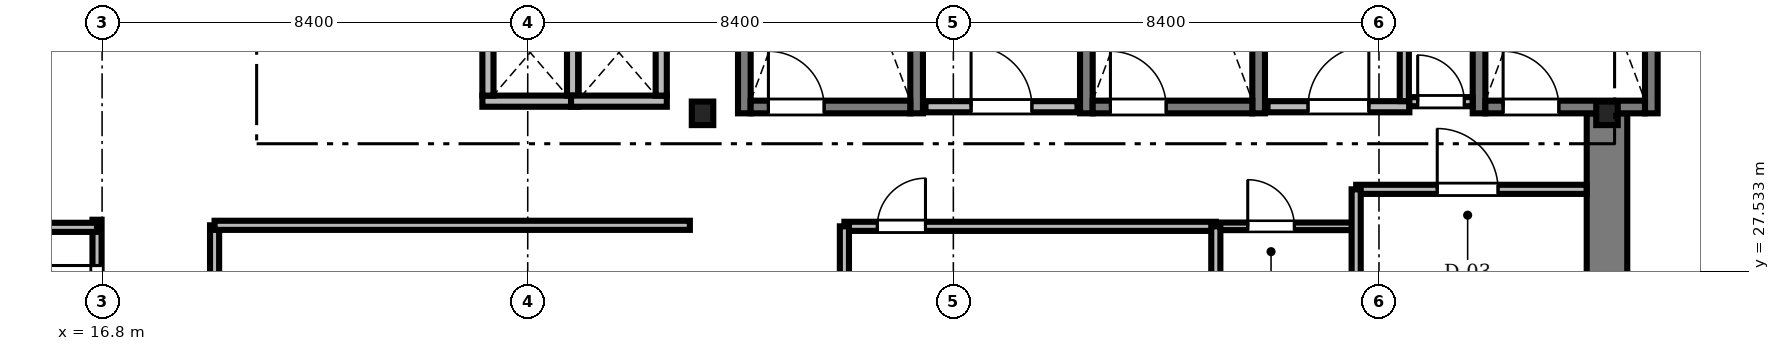
"""IFC4 building model, lengths in metres.
Left out: names, types, materials, properties, quantities, classifications, styles, units other than length and angle.
Written with IfcOpenShell. Run it as: python <this file> out.ifc"""

import sys

from ifc_helpers import new_model, si_unit, direction, frame, frame_2d, origin, origin_2d, place, context, subcontext, project, spatial, rectangle, i_section, extrude, source, transform, mapped, element, fill, save


model = new_model("IFC4")
c1 = context("Model", 3, precision=1e-05, world=origin(), true_north=direction((0.0, 1.0)))
c2 = subcontext(c1, "Body", "Model", "MODEL_VIEW")
j1 = project(units=[si_unit("LENGTHUNIT", "METRE"), si_unit("PLANEANGLEUNIT", "RADIAN")], contexts=[c1])
p1 = place(None, origin())
s1 = spatial("IfcSite", under=j1, at=p1, CompositionType="ELEMENT")
p2 = place(p1, origin())
s2 = spatial("IfcBuilding", under=s1, at=p2, CompositionType="ELEMENT")
p3 = place(p2, frame((0.0, 0.0, 152.0)))
s3 = spatial("IfcBuildingStorey", under=s2, at=p3, CompositionType="ELEMENT", Elevation=152.0)
m1 = source(origin(), c2, "Body", "SweptSolid", [
    extrude(rectangle(XDim=13.15, YDim=0.8, at=frame_2d((6.575, 0.0))), origin(), (0.0, 0.0, 1.0), 3.46),
])
p4 = place(p3, frame((46.5, 17.5, 0.0), z_axis=(0.0, 0.0, 1.0), x_axis=(0.0, 1.0, 0.0)))
e1 = element("IfcWall", 1, at=p4, inside=s3, PredefinedType="SHEAR", context=c2, shape_type="MappedRepresentation", body=[
    mapped(m1, transform((0.0, 0.0, 0.0), scale=1.0)),
])
m2 = source(origin(), c2, "Body", "SweptSolid", [
    extrude(i_section(OverallWidth=0.424, OverallDepth=0.465, WebThickness=0.035, FlangeThickness=0.056, FilletRadius=0.015, at=origin_2d()), origin(), (0.0, 0.0, 1.0), 3.46),
])
for number, where, z_axis, x_axis in (
    (2, (28.65, 30.65, 0.0), (0.0, 0.0, 1.0), (1.0, 0.0, 0.0)),
    (3, (46.5, 30.65, 0.0), (0.0, 0.0, 1.0), (1.0, 0.0, 0.0)),
):
    element("IfcColumn", number, at=place(p3, frame(where, z_axis=z_axis, x_axis=x_axis)), inside=s3, PredefinedType="COLUMN", context=c2, shape_type="MappedRepresentation", body=[
        mapped(m2, transform((0.0, 0.0, 0.0), scale=1.0)),
    ])
m3 = source(origin(), c2, "Body", "SweptSolid", [
    extrude(rectangle(XDim=9.25, YDim=0.25, at=frame_2d((4.625, 0.0))), origin(), (0.0, 0.0, 1.0), 3.5),
])
for number, where, z_axis, x_axis in (
    (4, (29.475, 30.65, 0.0), (0.0, 0.0, 1.0), (0.0, 1.0, 0.0)),
    (5, (32.875, 30.65, 0.0), (0.0, 0.0, 1.0), (0.0, 1.0, 0.0)),
):
    element("IfcWall", number, at=place(p3, frame(where, z_axis=z_axis, x_axis=x_axis)), inside=s3, PredefinedType="SOLIDWALL", context=c2, shape_type="MappedRepresentation", body=[
        mapped(m3, transform((0.0, 0.0, 0.0), scale=1.0)),
    ])
m4 = source(origin(), c2, "Body", "SweptSolid", [
    extrude(rectangle(XDim=3.15, YDim=0.25, at=frame_2d((1.575, 0.0))), origin(), (0.0, 0.0, 1.0), 3.5),
])
p5 = place(p3, frame((29.6, 30.775, 0.0), z_axis=(0.0, 0.0, 1.0), x_axis=(1.0, 0.0, 0.0)))
e6 = element("IfcWall", 6, at=p5, inside=s3, PredefinedType="SOLIDWALL", context=c2, shape_type="MappedRepresentation", body=[
    mapped(m4, transform((0.0, 0.0, 0.0), scale=1.0)),
])
m5 = source(origin(), c2, "Body", "SweptSolid", [
    extrude(rectangle(XDim=1.1, YDim=2.2, at=frame_2d((0.55, 1.1))), frame((0.0, 0.135, 0.0), z_axis=(0.0, -1.0, 0.0), x_axis=(1.0, 0.0, 0.0)), (0.0, 0.0, 1.0), 0.27),
])
p6 = place(p5, frame((0.35, 0.0, 0.0)))
e7 = element("IfcOpeningElement", 7, at=p6, cuts=e6, PredefinedType="OPENING", context=c2, shape_type="MappedRepresentation", body=[
    mapped(m5, transform((0.0, 0.0, 0.0), scale=1.0)),
])
for number, where, z_axis, x_axis in (
    (8, (36.225, 30.65, 0.0), (0.0, 0.0, 1.0), (0.0, 1.0, 0.0)),
    (9, (39.625, 30.65, 0.0), (0.0, 0.0, 1.0), (0.0, 1.0, 0.0)),
):
    element("IfcWall", number, at=place(p3, frame(where, z_axis=z_axis, x_axis=x_axis)), inside=s3, PredefinedType="SOLIDWALL", context=c2, shape_type="MappedRepresentation", body=[
        mapped(m3, transform((0.0, 0.0, 0.0), scale=1.0)),
    ])
p7 = place(p3, frame((36.35, 30.775, 0.0), z_axis=(0.0, 0.0, 1.0), x_axis=(1.0, 0.0, 0.0)))
e10 = element("IfcWall", 10, at=p7, inside=s3, PredefinedType="SOLIDWALL", context=c2, shape_type="MappedRepresentation", body=[
    mapped(m4, transform((0.0, 0.0, 0.0), scale=1.0)),
])
p8 = place(p7, frame((0.35, 0.0, 0.0)))
e11 = element("IfcOpeningElement", 11, at=p8, cuts=e10, PredefinedType="OPENING", context=c2, shape_type="MappedRepresentation", body=[
    mapped(m5, transform((0.0, 0.0, 0.0), scale=1.0)),
])
for number, where, z_axis, x_axis in (
    (12, (43.975, 30.65, 0.0), (0.0, 0.0, 1.0), (0.0, 1.0, 0.0)),
    (13, (47.375, 30.65, 0.0), (0.0, 0.0, 1.0), (0.0, 1.0, 0.0)),
):
    element("IfcWall", number, at=place(p3, frame(where, z_axis=z_axis, x_axis=x_axis)), inside=s3, PredefinedType="SOLIDWALL", context=c2, shape_type="MappedRepresentation", body=[
        mapped(m3, transform((0.0, 0.0, 0.0), scale=1.0)),
    ])
p9 = place(p3, frame((44.1, 30.775, 0.0), z_axis=(0.0, 0.0, 1.0), x_axis=(1.0, 0.0, 0.0)))
e14 = element("IfcWall", 14, at=p9, inside=s3, PredefinedType="SOLIDWALL", context=c2, shape_type="MappedRepresentation", body=[
    mapped(m4, transform((0.0, 0.0, 0.0), scale=1.0)),
])
p10 = place(p9, frame((0.35, 0.0, 0.0)))
e15 = element("IfcOpeningElement", 15, at=p10, cuts=e14, PredefinedType="OPENING", context=c2, shape_type="MappedRepresentation", body=[
    mapped(m5, transform((0.0, 0.0, 0.0), scale=1.0)),
])
m6 = source(origin(), c2, "Body", "SweptSolid", [
    extrude(rectangle(XDim=3.0, YDim=0.22, at=frame_2d((1.5, 0.0))), origin(), (0.0, 0.0, 1.0), 3.46),
])
p11 = place(p3, frame((33.05, 30.78, 0.0), z_axis=(0.0, 0.0, 1.0), x_axis=(1.0, 0.0, 0.0)))
e16 = element("IfcWall", 16, at=p11, inside=s3, PredefinedType="SOLIDWALL", context=c2, shape_type="MappedRepresentation", body=[
    mapped(m6, transform((0.0, 0.0, 0.0), scale=1.0)),
])
m7 = source(origin(), c2, "Body", "SweptSolid", [
    extrude(rectangle(XDim=1.2, YDim=2.2, at=frame_2d((0.6, 1.1))), frame((0.0, 0.12, 0.0), z_axis=(0.0, -1.0, 0.0), x_axis=(1.0, 0.0, 0.0)), (0.0, 0.0, 1.0), 0.24),
])
p12 = place(p11, frame((0.9, 0.0, 0.0)))
e17 = element("IfcOpeningElement", 17, at=p12, cuts=e16, PredefinedType="OPENING", context=c2, shape_type="MappedRepresentation", body=[
    mapped(m7, transform((0.0, 0.0, 0.0), scale=1.0)),
])
m8 = source(origin(), c2, "Body", "SweptSolid", [
    extrude(rectangle(XDim=2.8, YDim=0.22, at=frame_2d((1.4, 0.0))), origin(), (0.0, 0.0, 1.0), 3.46),
])
p13 = place(p3, frame((39.8, 30.78, 0.0), z_axis=(0.0, 0.0, 1.0), x_axis=(1.0, 0.0, 0.0)))
e18 = element("IfcWall", 18, at=p13, inside=s3, PredefinedType="SOLIDWALL", context=c2, shape_type="MappedRepresentation", body=[
    mapped(m8, transform((0.0, 0.0, 0.0), scale=1.0)),
])
p14 = place(p13, frame((0.8, 0.0, 0.0)))
e19 = element("IfcOpeningElement", 19, at=p14, cuts=e18, PredefinedType="OPENING", context=c2, shape_type="MappedRepresentation", body=[
    mapped(m7, transform((0.0, 0.0, 0.0), scale=1.0)),
])
m9 = source(origin(), c2, "Body", "SweptSolid", [
    extrude(rectangle(XDim=1.89, YDim=0.22, at=frame_2d((0.945, 0.0))), origin(), (0.0, 0.0, 1.0), 3.46),
])
p15 = place(p3, frame((24.305, 30.89, 0.0), z_axis=(0.0, 0.0, 1.0), x_axis=(1.0, 0.0, 0.0)))
e20 = element("IfcWall", 20, at=p15, inside=s3, PredefinedType="SOLIDWALL", context=c2, shape_type="MappedRepresentation", body=[
    mapped(m9, transform((0.0, 0.0, 0.0), scale=1.0)),
])
m10 = source(origin(), c2, "Body", "SweptSolid", [
    extrude(rectangle(XDim=1.7, YDim=0.22, at=frame_2d((0.85, 0.0))), origin(), (0.0, 0.0, 1.0), 3.46),
])
for number, where, z_axis, x_axis in (
    (21, (24.415, 31.0, 0.0), (0.0, 0.0, 1.0), (0.0, 1.0, 0.0)),
    (22, (26.085, 31.0, 0.0), (0.0, 0.0, 1.0), (0.0, 1.0, 0.0)),
):
    element("IfcWall", number, at=place(p3, frame(where, z_axis=z_axis, x_axis=x_axis)), inside=s3, PredefinedType="SOLIDWALL", context=c2, shape_type="MappedRepresentation", body=[
        mapped(m10, transform((0.0, 0.0, 0.0), scale=1.0)),
    ])
p16 = place(p3, frame((26.055, 30.89, 0.0), z_axis=(0.0, 0.0, 1.0), x_axis=(1.0, 0.0, 0.0)))
e23 = element("IfcWall", 23, at=p16, inside=s3, PredefinedType="SOLIDWALL", context=c2, shape_type="MappedRepresentation", body=[
    mapped(m9, transform((0.0, 0.0, 0.0), scale=1.0)),
])
p17 = place(p3, frame((27.835, 31.0, 0.0), z_axis=(0.0, 0.0, 1.0), x_axis=(0.0, 1.0, 0.0)))
e24 = element("IfcWall", 24, at=p17, inside=s3, PredefinedType="SOLIDWALL", context=c2, shape_type="MappedRepresentation", body=[
    mapped(m10, transform((0.0, 0.0, 0.0), scale=1.0)),
])
m11 = source(origin(), c2, "Body", "SweptSolid", [
    extrude(rectangle(XDim=14.6, YDim=0.18, at=frame_2d((7.3, 0.0))), origin(), (0.0, 0.0, 1.0), 2.852),
])
p18 = place(p3, frame((16.7, 13.95, 0.0), z_axis=(0.0, 0.0, 1.0), x_axis=(0.0, 1.0, 0.0)))
e25 = element("IfcWall", 25, at=p18, inside=s3, PredefinedType="PARTITIONING", context=c2, shape_type="MappedRepresentation", body=[
    mapped(m11, transform((0.0, 0.0, 0.0), scale=1.0)),
])
m12 = source(origin(), c2, "Body", "SweptSolid", [
    extrude(rectangle(XDim=1.05, YDim=2.2, at=frame_2d((0.525, 1.1))), frame((0.0, 0.1, 0.0), z_axis=(0.0, -1.0, 0.0), x_axis=(1.0, 0.0, 0.0)), (0.0, 0.0, 1.0), 0.2),
])
p19 = place(p18, frame((1.888, 0.0, 0.0)))
e26 = element("IfcOpeningElement", 26, at=p19, cuts=e25, PredefinedType="OPENING", context=c2, shape_type="MappedRepresentation", body=[
    mapped(m12, transform((0.0, 0.0, 0.0), scale=1.0)),
])
m13 = source(origin(), c2, "Body", "SweptSolid", [
    extrude(rectangle(XDim=0.95, YDim=2.15, at=frame_2d((0.475, 1.075))), frame((0.0, 0.1, 0.0), z_axis=(0.0, -1.0, 0.0), x_axis=(1.0, 0.0, 0.0)), (0.0, 0.0, 1.0), 0.2),
])
p20 = place(p18, frame((7.93, 0.0, 0.0)))
e27 = element("IfcOpeningElement", 27, at=p20, cuts=e25, PredefinedType="OPENING", context=c2, shape_type="MappedRepresentation", body=[
    mapped(m13, transform((0.0, 0.0, 0.0), scale=1.0)),
])
p21 = place(p18, frame((12.747, 0.0, 0.0)))
e28 = element("IfcOpeningElement", 28, at=p21, cuts=e25, PredefinedType="OPENING", context=c2, shape_type="MappedRepresentation", body=[
    mapped(m13, transform((0.0, 0.0, 0.0), scale=1.0)),
])
m14 = source(origin(), c2, "Body", "SweptSolid", [
    extrude(rectangle(XDim=11.94, YDim=0.18, at=frame_2d((5.97, 0.0))), origin(), (0.0, 0.0, 1.0), 2.852),
])
p22 = place(p3, frame((19.02, 16.5, 0.0), z_axis=(0.0, 0.0, 1.0), x_axis=(0.0, 1.0, 0.0)))
e29 = element("IfcWall", 29, at=p22, inside=s3, PredefinedType="PARTITIONING", context=c2, shape_type="MappedRepresentation", body=[
    mapped(m14, transform((0.0, 0.0, 0.0), scale=1.0)),
])
p23 = place(p22, frame((4.5, 0.0, 0.0)))
e30 = element("IfcOpeningElement", 30, at=p23, cuts=e29, PredefinedType="OPENING", context=c2, shape_type="MappedRepresentation", body=[
    mapped(m12, transform((0.0, 0.0, 0.0), scale=1.0)),
])
m15 = source(origin(), c2, "Body", "SweptSolid", [
    extrude(rectangle(XDim=7.33, YDim=0.18, at=frame_2d((3.665, 0.0))), origin(), (0.0, 0.0, 1.0), 3.092),
])
p24 = place(p3, frame((31.45, 28.42, 0.0), z_axis=(0.0, 0.0, 1.0), x_axis=(1.0, 0.0, 0.0)))
e31 = element("IfcWall", 31, at=p24, inside=s3, PredefinedType="PARTITIONING", context=c2, shape_type="MappedRepresentation", body=[
    mapped(m15, transform((0.0, 0.0, 0.0), scale=1.0)),
])
p25 = place(p24, frame((0.65, 0.0, 0.0)))
e32 = element("IfcOpeningElement", 32, at=p25, cuts=e31, PredefinedType="OPENING", context=c2, shape_type="MappedRepresentation", body=[
    mapped(m13, transform((0.0, 0.0, 0.0), scale=1.0)),
])
m16 = source(origin(), c2, "Body", "SweptSolid", [
    extrude(rectangle(XDim=4.548, YDim=0.18, at=frame_2d((2.274, 0.0))), origin(), (0.0, 0.0, 1.0), 3.092),
])
p26 = place(p3, frame((41.55, 29.15, 0.0), z_axis=(0.0, 0.0, 1.0), x_axis=(1.0, 0.0, 0.0)))
e33 = element("IfcWall", 33, at=p26, inside=s3, PredefinedType="PARTITIONING", context=c2, shape_type="MappedRepresentation", body=[
    mapped(m16, transform((0.0, 0.0, 0.0), scale=1.0)),
])
m17 = source(origin(), c2, "Body", "SweptSolid", [
    extrude(rectangle(XDim=1.2, YDim=2.2, at=frame_2d((0.6, 1.1))), frame((0.0, 0.1, 0.0), z_axis=(0.0, -1.0, 0.0), x_axis=(1.0, 0.0, 0.0)), (0.0, 0.0, 1.0), 0.2),
])
p27 = place(p26, frame((1.6, 0.0, 0.0)))
e34 = element("IfcOpeningElement", 34, at=p27, cuts=e33, PredefinedType="OPENING", context=c2, shape_type="MappedRepresentation", body=[
    mapped(m17, transform((0.0, 0.0, 0.0), scale=1.0)),
])
m18 = source(origin(), c2, "Body", "SweptSolid", [
    extrude(rectangle(XDim=2.74, YDim=0.15, at=frame_2d((1.37, 0.0))), origin(), (0.0, 0.0, 1.0), 3.46),
])
p28 = place(p3, frame((38.78, 28.42, 0.0), z_axis=(0.0, 0.0, 1.0), x_axis=(1.0, 0.0, 0.0)))
e35 = element("IfcWall", 35, at=p28, inside=s3, PredefinedType="PARTITIONING", context=c2, shape_type="MappedRepresentation", body=[
    mapped(m18, transform((0.0, 0.0, 0.0), scale=1.0)),
])
m19 = source(origin(), c2, "Body", "SweptSolid", [
    extrude(rectangle(XDim=0.92, YDim=2.1, at=frame_2d((0.46, 1.05))), frame((0.0, 0.085, 0.0), z_axis=(0.0, -1.0, 0.0), x_axis=(1.0, 0.0, 0.0)), (0.0, 0.0, 1.0), 0.17),
])
p29 = place(p28, frame((0.63, 0.0, 0.0)))
e36 = element("IfcOpeningElement", 36, at=p29, cuts=e35, PredefinedType="OPENING", context=c2, shape_type="MappedRepresentation", body=[
    mapped(m19, transform((0.0, 0.0, 0.0), scale=1.0)),
])
m20 = source(origin(), c2, "Body", "SweptSolid", [
    extrude(rectangle(XDim=1.248, YDim=0.18, at=frame_2d((0.624, 0.0))), origin(), (0.0, 0.0, 1.0), 3.46),
])
p30 = place(p3, frame((42.6, 30.88, 0.0), z_axis=(0.0, 0.0, 1.0), x_axis=(1.0, 0.0, 0.0)))
e37 = element("IfcWall", 37, at=p30, inside=s3, PredefinedType="PARTITIONING", context=c2, shape_type="MappedRepresentation", body=[
    mapped(m20, transform((0.0, 0.0, 0.0), scale=1.0)),
])
m21 = source(origin(), c2, "Body", "SweptSolid", [
    extrude(rectangle(XDim=0.92, YDim=2.1, at=frame_2d((0.46, 1.05))), frame((0.0, 0.1, 0.0), z_axis=(0.0, -1.0, 0.0), x_axis=(1.0, 0.0, 0.0)), (0.0, 0.0, 1.0), 0.2),
])
p31 = place(p30, frame((0.164, 0.0, 0.0)))
e38 = element("IfcOpeningElement", 38, at=p31, cuts=e37, PredefinedType="OPENING", context=c2, shape_type="MappedRepresentation", body=[
    mapped(m21, transform((0.0, 0.0, 0.0), scale=1.0)),
])
m22 = source(origin(), c2, "Body", "SweptSolid", [
    extrude(rectangle(XDim=9.97, YDim=0.18, at=frame_2d((4.985, 0.0))), origin(), (0.0, 0.0, 1.0), 2.702),
])
p32 = place(p3, frame((6.73, 28.4, 0.0), z_axis=(0.0, 0.0, 1.0), x_axis=(1.0, 0.0, 0.0)))
e39 = element("IfcWall", 39, at=p32, inside=s3, PredefinedType="PARTITIONING", context=c2, shape_type="MappedRepresentation", body=[
    mapped(m22, transform((0.0, 0.0, 0.0), scale=1.0)),
])
m23 = source(origin(), c2, "Body", "SweptSolid", [
    extrude(rectangle(XDim=9.38, YDim=0.18, at=frame_2d((4.69, 0.0))), origin(), (0.0, 0.0, 1.0), 3.46),
])
p33 = place(p3, frame((19.02, 28.44, 0.0), z_axis=(0.0, 0.0, 1.0), x_axis=(1.0, 0.0, 0.0)))
e40 = element("IfcWall", 40, at=p33, inside=s3, PredefinedType="PARTITIONING", context=c2, shape_type="MappedRepresentation", body=[
    mapped(m23, transform((0.0, 0.0, 0.0), scale=1.0)),
])
m24 = source(origin(), c2, "Body", "SweptSolid", [
    extrude(rectangle(XDim=2.758, YDim=0.18, at=frame_2d((1.379, 0.0))), origin(), (0.0, 0.0, 1.0), 3.46),
])
p34 = place(p3, frame((42.5, 30.892, 0.0), z_axis=(0.0, 0.0, 1.0), x_axis=(0.0, 1.0, 0.0)))
e41 = element("IfcWall", 41, at=p34, inside=s3, PredefinedType="PARTITIONING", context=c2, shape_type="MappedRepresentation", body=[
    mapped(m24, transform((0.0, 0.0, 0.0), scale=1.0)),
])
m25 = source(origin(), c2, "Body", "SweptSolid", [
    extrude(rectangle(XDim=2.35, YDim=0.18, at=frame_2d((1.175, 0.0))), origin(), (0.0, 0.0, 1.0), 2.852),
])
p35 = place(p3, frame((41.55, 26.8, 0.0), z_axis=(0.0, 0.0, 1.0), x_axis=(0.0, 1.0, 0.0)))
e42 = element("IfcWall", 42, at=p35, inside=s3, PredefinedType="PARTITIONING", context=c2, shape_type="MappedRepresentation", body=[
    mapped(m25, transform((0.0, 0.0, 0.0), scale=1.0)),
])
m26 = source(origin(), c2, "Body", "SweptSolid", [
    extrude(rectangle(XDim=1.6, YDim=0.18, at=frame_2d((0.8, 0.0))), origin(), (0.0, 0.0, 1.0), 3.002),
])
for number, where, z_axis, x_axis in (
    (43, (31.45, 26.82, 0.0), (0.0, 0.0, 1.0), (0.0, 1.0, 0.0)),
    (44, (38.78, 26.82, 0.0), (0.0, 0.0, 1.0), (0.0, 1.0, 0.0)),
):
    element("IfcWall", number, at=place(p3, frame(where, z_axis=z_axis, x_axis=x_axis)), inside=s3, PredefinedType="PARTITIONING", context=c2, shape_type="MappedRepresentation", body=[
        mapped(m26, transform((0.0, 0.0, 0.0), scale=1.0)),
    ])
m27 = source(origin(), c2, "Body", "SweptSolid", [
    extrude(rectangle(XDim=1.1, YDim=2.2, at=frame_2d((0.55, 1.1))), frame((0.0, 0.025, 0.0), z_axis=(0.0, -1.0, 0.0), x_axis=(1.0, 0.0, 0.0)), (0.0, 0.0, 1.0), 0.05),
])
p36 = place(p6, origin())
e45 = element("IfcDoor", 45, at=p36, inside=s3, OperationType="SINGLE_SWING_LEFT", PredefinedType="DOOR", context=c2, shape_type="MappedRepresentation", body=[
    mapped(m27, transform((0.0, 0.0, 0.0), scale=1.0)),
])
fill(e7, e45)
p37 = place(p8, origin())
e46 = element("IfcDoor", 46, at=p37, inside=s3, OperationType="SINGLE_SWING_LEFT", PredefinedType="DOOR", context=c2, shape_type="MappedRepresentation", body=[
    mapped(m27, transform((0.0, 0.0, 0.0), scale=1.0)),
])
fill(e11, e46)
p38 = place(p10, origin())
e47 = element("IfcDoor", 47, at=p38, inside=s3, OperationType="SINGLE_SWING_LEFT", PredefinedType="DOOR", context=c2, shape_type="MappedRepresentation", body=[
    mapped(m27, transform((0.0, 0.0, 0.0), scale=1.0)),
])
fill(e15, e47)
m28 = source(origin(), c2, "Body", "SweptSolid", [
    extrude(rectangle(XDim=1.2, YDim=2.2, at=frame_2d((0.6, 1.1))), frame((0.0, 0.025, 0.0), z_axis=(0.0, -1.0, 0.0), x_axis=(1.0, 0.0, 0.0)), (0.0, 0.0, 1.0), 0.05),
])
p39 = place(p12, origin())
e48 = element("IfcDoor", 48, at=p39, inside=s3, OperationType="SINGLE_SWING_LEFT", PredefinedType="DOOR", context=c2, shape_type="MappedRepresentation", body=[
    mapped(m28, transform((0.0, 0.0, 0.0), scale=1.0)),
])
fill(e17, e48)
p40 = place(p14, origin())
e49 = element("IfcDoor", 49, at=p40, inside=s3, OperationType="SINGLE_SWING_RIGHT", PredefinedType="DOOR", context=c2, shape_type="MappedRepresentation", body=[
    mapped(m28, transform((0.0, 0.0, 0.0), scale=1.0)),
])
fill(e19, e49)
m29 = source(origin(), c2, "Body", "SweptSolid", [
    extrude(rectangle(XDim=0.95, YDim=2.15, at=frame_2d((0.475, 1.075))), frame((0.0, 0.025, 0.0), z_axis=(0.0, -1.0, 0.0), x_axis=(1.0, 0.0, 0.0)), (0.0, 0.0, 1.0), 0.05),
])
p41 = place(p21, origin())
e50 = element("IfcDoor", 50, at=p41, inside=s3, OperationType="SINGLE_SWING_RIGHT", PredefinedType="DOOR", context=c2, shape_type="MappedRepresentation", body=[
    mapped(m29, transform((0.0, 0.0, 0.0), scale=1.0)),
])
fill(e28, e50)
p42 = place(p25, origin())
e51 = element("IfcDoor", 51, at=p42, inside=s3, OperationType="SINGLE_SWING_RIGHT", PredefinedType="DOOR", context=c2, shape_type="MappedRepresentation", body=[
    mapped(m29, transform((0.0, 0.0, 0.0), scale=1.0)),
])
fill(e32, e51)
p43 = place(p27, origin())
e52 = element("IfcDoor", 52, at=p43, inside=s3, OperationType="SINGLE_SWING_LEFT", PredefinedType="DOOR", context=c2, shape_type="MappedRepresentation", body=[
    mapped(m28, transform((0.0, 0.0, 0.0), scale=1.0)),
])
fill(e34, e52)
m30 = source(origin(), c2, "Body", "SweptSolid", [
    extrude(rectangle(XDim=0.92, YDim=2.1, at=frame_2d((0.46, 1.05))), frame((0.0, 0.025, 0.0), z_axis=(0.0, -1.0, 0.0), x_axis=(1.0, 0.0, 0.0)), (0.0, 0.0, 1.0), 0.05),
])
p44 = place(p29, origin())
e53 = element("IfcDoor", 53, at=p44, inside=s3, OperationType="SINGLE_SWING_LEFT", PredefinedType="DOOR", context=c2, shape_type="MappedRepresentation", body=[
    mapped(m30, transform((0.0, 0.0, 0.0), scale=1.0)),
])
fill(e36, e53)
p45 = place(p31, origin())
e54 = element("IfcDoor", 54, at=p45, inside=s3, OperationType="SINGLE_SWING_LEFT", PredefinedType="DOOR", context=c2, shape_type="MappedRepresentation", body=[
    mapped(m30, transform((0.0, 0.0, 0.0), scale=1.0)),
])
fill(e38, e54)
save(model, sys.argv[1])
